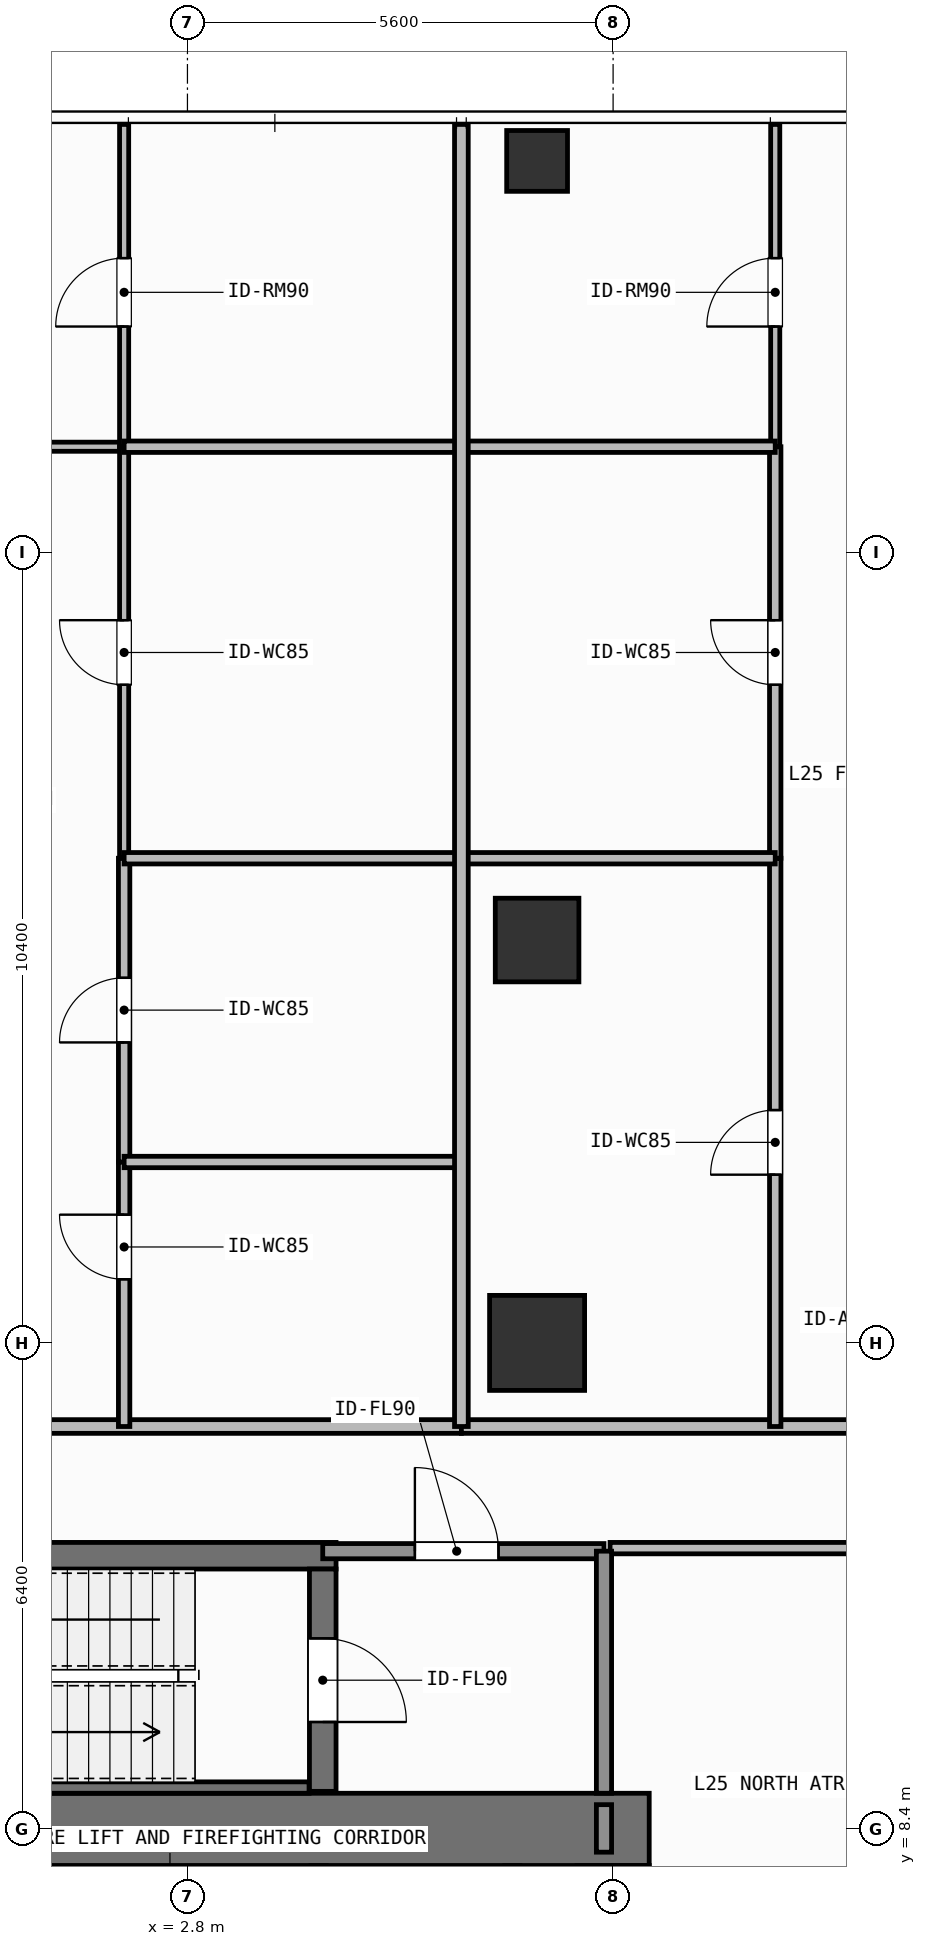
"""IFC4 building model, lengths in metres.
Left out: names, types, materials, properties, quantities, classifications, styles, units other than length and angle.
Written with IfcOpenShell. Run it as: python <this file> out.ifc"""

import sys

from ifc_helpers import new_model, si_unit, direction, frame, frame_2d, origin, origin_2d, place, context, subcontext, project, spatial, rectangle, hollow_rectangle, extrude, element, fill, save


model = new_model("IFC4")
c1 = context("Model", 3, precision=1e-05, world=origin(), true_north=direction((0.0, 1.0)))
c2 = subcontext(c1, "Body", "Model", "MODEL_VIEW")
j1 = project(units=[si_unit("LENGTHUNIT", "METRE"), si_unit("PLANEANGLEUNIT", "RADIAN")], contexts=[c1])
p1 = place(None, origin())
s1 = spatial("IfcSite", under=j1, at=p1, CompositionType="ELEMENT")
p2 = place(p1, origin())
s2 = spatial("IfcBuilding", under=s1, at=p2, CompositionType="ELEMENT")
p3 = place(p2, frame((0.0, 0.0, 100.8)))
s3 = spatial("IfcBuildingStorey", under=s2, at=p3, CompositionType="ELEMENT", Elevation=100.8)
p4 = place(p3, frame((-7.55, 8.4, 0.0), z_axis=(0.0, 0.0, 1.0), x_axis=(1.0, 0.0, 0.0)))
e1 = element("IfcWall", 1, at=p4, inside=s3, PredefinedType="SHEAR", context=c2, shape_type="SweptSolid", body=[
    extrude(rectangle(XDim=16.425, YDim=0.95, at=frame_2d((8.212, 0.0))), origin(), (0.0, 0.0, 1.0), 3.9),
])
p5 = place(p3, frame((8.4, 5.825, 0.0), z_axis=(0.0, 0.0, 1.0), x_axis=(0.0, 1.0, 0.0)))
e2 = element("IfcWall", 2, at=p5, inside=s3, PredefinedType="SHEAR", context=c2, shape_type="SweptSolid", body=[
    extrude(rectangle(XDim=2.1, YDim=0.95, at=frame_2d((1.05, 0.0))), origin(), (0.0, 0.0, 1.0), 3.9),
])
p6 = place(p3, frame((-2.555, 12.0, 0.0), z_axis=(0.0, 0.0, 1.0), x_axis=(1.0, 0.0, 0.0)))
e3 = element("IfcWall", 3, at=p6, inside=s3, PredefinedType="SHEAR", context=c2, shape_type="SweptSolid", body=[
    extrude(rectangle(XDim=7.31, YDim=0.35, at=frame_2d((3.655, 0.0))), origin(), (0.0, 0.0, 1.0), 3.9),
])
p7 = place(p3, frame((-2.2, 8.95, 0.0), z_axis=(0.0, 0.0, 1.0), x_axis=(1.0, 0.0, 0.0)))
e4 = element("IfcWall", 4, at=p7, inside=s3, PredefinedType="SHEAR", context=c2, shape_type="SweptSolid", body=[
    extrude(rectangle(XDim=6.6, YDim=0.15, at=frame_2d((3.3, 0.0))), origin(), (0.0, 0.0, 1.0), 3.9),
])
p8 = place(p3, frame((4.58, 11.825, 0.0), z_axis=(0.0, 0.0, 1.0), x_axis=(0.0, -1.0, 0.0)))
e5 = element("IfcWall", 5, at=p8, inside=s3, PredefinedType="SHEAR", context=c2, shape_type="SweptSolid", body=[
    extrude(rectangle(XDim=2.925, YDim=0.35, at=frame_2d((1.462, 0.0))), origin(), (0.0, 0.0, 1.0), 3.9),
])
p9 = place(p8, frame((0.913, 0.0, 0.0)))
e6 = element("IfcOpeningElement", 6, at=p9, cuts=e5, PredefinedType="OPENING", context=c2, shape_type="SweptSolid", body=[
    extrude(rectangle(XDim=1.1, YDim=2.15, at=frame_2d((0.55, 1.075))), frame((0.0, 0.185, 0.0), z_axis=(0.0, -1.0, 0.0), x_axis=(1.0, 0.0, 0.0)), (0.0, 0.0, 1.0), 0.37),
])
p10 = place(p3, frame((7.4, 14.8, 0.0), z_axis=(0.0, 0.0, 1.0), x_axis=(1.0, 0.0, 0.0)))
e7 = element("IfcColumn", 7, at=p10, inside=s3, PredefinedType="COLUMN", context=c2, shape_type="SweptSolid", body=[
    extrude(rectangle(XDim=1.25, YDim=1.25, at=origin_2d()), origin(), (0.0, 0.0, 1.0), 3.9),
])
p11 = place(p3, frame((7.4, 20.1, 0.0), z_axis=(0.0, 0.0, 1.0), x_axis=(1.0, 0.0, 0.0)))
e8 = element("IfcColumn", 8, at=p11, inside=s3, PredefinedType="COLUMN", context=c2, shape_type="SweptSolid", body=[
    extrude(rectangle(XDim=1.1, YDim=1.1, at=origin_2d()), origin(), (0.0, 0.0, 1.0), 3.9),
])
p12 = place(p3, frame((7.4, 30.35, 0.0), z_axis=(0.0, 0.0, 1.0), x_axis=(1.0, 0.0, 0.0)))
e9 = element("IfcColumn", 9, at=p12, inside=s3, PredefinedType="COLUMN", context=c2, shape_type="SweptSolid", body=[
    extrude(hollow_rectangle(XDim=0.8, YDim=0.8, WallThickness=0.036, at=origin_2d()), origin(), (0.0, 0.0, 1.0), 3.9),
])
p13 = place(p3, frame((4.525, 5.825, 0.0), z_axis=(0.0, 0.0, 1.0), x_axis=(0.0, 1.0, 0.0)))
e10 = element("IfcWall", 10, at=p13, inside=s3, PredefinedType="SHEAR", context=c2, shape_type="SweptSolid", body=[
    extrude(rectangle(XDim=2.1, YDim=0.2, at=frame_2d((1.05, 0.0))), origin(), (0.0, 0.0, 1.0), 3.68),
])
p14 = place(p13, frame((0.425, 0.0, 0.0)))
e11 = element("IfcOpeningElement", 11, at=p14, cuts=e10, PredefinedType="OPENING", context=c2, shape_type="SweptSolid", body=[
    extrude(rectangle(XDim=1.1, YDim=2.2, at=frame_2d((0.55, 1.1))), frame((0.0, 0.11, 0.0), z_axis=(0.0, -1.0, 0.0), x_axis=(1.0, 0.0, 0.0)), (0.0, 0.0, 1.0), 0.22),
])
p15 = place(p3, frame((7.075, 5.825, 0.0), z_axis=(0.0, 0.0, 1.0), x_axis=(0.0, 1.0, 0.0)))
e12 = element("IfcWall", 12, at=p15, inside=s3, PredefinedType="SHEAR", context=c2, shape_type="SweptSolid", body=[
    extrude(rectangle(XDim=2.1, YDim=0.2, at=frame_2d((1.05, 0.0))), origin(), (0.0, 0.0, 1.0), 3.68),
])
p16 = place(p3, frame((4.58, 12.06, 0.0), z_axis=(0.0, 0.0, 1.0), x_axis=(1.0, 0.0, 0.0)))
e13 = element("IfcWall", 13, at=p16, inside=s3, PredefinedType="SOLIDWALL", context=c2, shape_type="SweptSolid", body=[
    extrude(rectangle(XDim=3.7, YDim=0.2, at=frame_2d((1.85, 0.0))), origin(), (0.0, 0.0, 1.0), 3.68),
])
p17 = place(p16, frame((1.212, 0.0, 0.0)))
e14 = element("IfcOpeningElement", 14, at=p17, cuts=e13, PredefinedType="OPENING", context=c2, shape_type="SweptSolid", body=[
    extrude(rectangle(XDim=1.1, YDim=2.15, at=frame_2d((0.55, 1.075))), frame((0.0, 0.11, 0.0), z_axis=(0.0, -1.0, 0.0), x_axis=(1.0, 0.0, 0.0)), (0.0, 0.0, 1.0), 0.22),
])
p18 = place(p3, frame((8.36, 12.1, 0.0), z_axis=(0.0, 0.0, 1.0), x_axis=(1.0, 0.0, 0.0)))
e15 = element("IfcWall", 15, at=p18, inside=s3, PredefinedType="PARTITIONING", context=c2, shape_type="SweptSolid", body=[
    extrude(rectangle(XDim=7.22, YDim=0.15, at=frame_2d((3.61, 0.0))), origin(), (0.0, 0.0, 1.0), 3.68),
])
p19 = place(p18, frame((3.513, 0.0, 0.0)))
e16 = element("IfcOpeningElement", 16, at=p19, cuts=e15, PredefinedType="OPENING", context=c2, shape_type="SweptSolid", body=[
    extrude(rectangle(XDim=0.9, YDim=2.1, at=frame_2d((0.45, 1.05))), frame((0.0, 0.085, 0.0), z_axis=(0.0, -1.0, 0.0), x_axis=(1.0, 0.0, 0.0)), (0.0, 0.0, 1.0), 0.17),
])
p20 = place(p3, frame((-14.808, 13.7, 0.0), z_axis=(0.0, 0.0, 1.0), x_axis=(1.0, 0.0, 0.0)))
e17 = element("IfcWall", 17, at=p20, inside=s3, PredefinedType="PARTITIONING", context=c2, shape_type="SweptSolid", body=[
    extrude(rectangle(XDim=21.212, YDim=0.18, at=frame_2d((10.606, 0.0))), origin(), (0.0, 0.0, 1.0), 3.68),
])
p21 = place(p20, frame((11.271, 0.0, 0.0)))
e18 = element("IfcOpeningElement", 18, at=p21, cuts=e17, PredefinedType="OPENING", context=c2, shape_type="SweptSolid", body=[
    extrude(rectangle(XDim=1.0, YDim=2.2, at=frame_2d((0.5, 1.1))), frame((0.0, 0.1, 0.0), z_axis=(0.0, -1.0, 0.0), x_axis=(1.0, 0.0, 0.0)), (0.0, 0.0, 1.0), 0.2),
])
p22 = place(p3, frame((-3.723, 26.59, 0.0), z_axis=(0.0, 0.0, 1.0), x_axis=(1.0, 0.0, 0.0)))
e19 = element("IfcWall", 19, at=p22, inside=s3, PredefinedType="PARTITIONING", context=c2, shape_type="SweptSolid", body=[
    extrude(rectangle(XDim=5.69, YDim=0.12, at=frame_2d((2.845, 0.0))), origin(), (0.0, 0.0, 1.0), 3.68),
])
p23 = place(p22, frame((2.306, 0.0, 0.0)))
e20 = element("IfcOpeningElement", 20, at=p23, cuts=e19, PredefinedType="OPENING", context=c2, shape_type="SweptSolid", body=[
    extrude(rectangle(XDim=0.9, YDim=2.1, at=frame_2d((0.45, 1.05))), frame((0.0, 0.07, 0.0), z_axis=(0.0, -1.0, 0.0), x_axis=(1.0, 0.0, 0.0)), (0.0, 0.0, 1.0), 0.14),
])
p24 = place(p3, frame((1.967, 13.7, 0.0), z_axis=(0.0, 0.0, 1.0), x_axis=(0.0, 1.0, 0.0)))
e21 = element("IfcWall", 21, at=p24, inside=s3, PredefinedType="PARTITIONING", context=c2, shape_type="SweptSolid", body=[
    extrude(rectangle(XDim=3.48, YDim=0.15, at=frame_2d((1.74, 0.0))), origin(), (0.0, 0.0, 1.0), 3.68),
])
p25 = place(p24, frame((1.937, 0.0, 0.0)))
e22 = element("IfcOpeningElement", 22, at=p25, cuts=e21, PredefinedType="OPENING", context=c2, shape_type="SweptSolid", body=[
    extrude(rectangle(XDim=0.85, YDim=2.1, at=frame_2d((0.425, 1.05))), frame((0.0, 0.085, 0.0), z_axis=(0.0, -1.0, 0.0), x_axis=(1.0, 0.0, 0.0)), (0.0, 0.0, 1.0), 0.17),
])
p26 = place(p3, frame((1.967, 17.18, 0.0), z_axis=(0.0, 0.0, 1.0), x_axis=(0.0, 1.0, 0.0)))
e23 = element("IfcWall", 23, at=p26, inside=s3, PredefinedType="PARTITIONING", context=c2, shape_type="SweptSolid", body=[
    extrude(rectangle(XDim=3.996, YDim=0.15, at=frame_2d((1.998, 0.0))), origin(), (0.0, 0.0, 1.0), 3.68),
])
p27 = place(p26, frame((1.573, 0.0, 0.0)))
e24 = element("IfcOpeningElement", 24, at=p27, cuts=e23, PredefinedType="OPENING", context=c2, shape_type="SweptSolid", body=[
    extrude(rectangle(XDim=0.85, YDim=2.1, at=frame_2d((0.425, 1.05))), frame((0.0, 0.085, 0.0), z_axis=(0.0, -1.0, 0.0), x_axis=(1.0, 0.0, 0.0)), (0.0, 0.0, 1.0), 0.17),
])
p28 = place(p3, frame((1.967, 21.176, 0.0), z_axis=(0.0, 0.0, 1.0), x_axis=(0.0, 1.0, 0.0)))
e25 = element("IfcWall", 25, at=p28, inside=s3, PredefinedType="PARTITIONING", context=c2, shape_type="SweptSolid", body=[
    extrude(rectangle(XDim=5.414, YDim=0.12, at=frame_2d((2.707, 0.0))), origin(), (0.0, 0.0, 1.0), 3.68),
])
p29 = place(p28, frame((2.282, 0.0, 0.0)))
e26 = element("IfcOpeningElement", 26, at=p29, cuts=e25, PredefinedType="OPENING", context=c2, shape_type="SweptSolid", body=[
    extrude(rectangle(XDim=0.85, YDim=2.1, at=frame_2d((0.425, 1.05))), frame((0.0, 0.07, 0.0), z_axis=(0.0, -1.0, 0.0), x_axis=(1.0, 0.0, 0.0)), (0.0, 0.0, 1.0), 0.14),
])
p30 = place(p3, frame((1.967, 26.59, 0.0), z_axis=(0.0, 0.0, 1.0), x_axis=(0.0, 1.0, 0.0)))
e27 = element("IfcWall", 27, at=p30, inside=s3, PredefinedType="PARTITIONING", context=c2, shape_type="SweptSolid", body=[
    extrude(rectangle(XDim=4.24, YDim=0.12, at=frame_2d((2.12, 0.0))), origin(), (0.0, 0.0, 1.0), 3.68),
])
p31 = place(p30, frame((1.581, 0.0, 0.0)))
e28 = element("IfcOpeningElement", 28, at=p31, cuts=e27, PredefinedType="OPENING", context=c2, shape_type="SweptSolid", body=[
    extrude(rectangle(XDim=0.9, YDim=2.1, at=frame_2d((0.45, 1.05))), frame((0.0, 0.07, 0.0), z_axis=(0.0, -1.0, 0.0), x_axis=(1.0, 0.0, 0.0)), (0.0, 0.0, 1.0), 0.14),
])
p32 = place(p3, frame((6.404, 13.7, 0.0), z_axis=(0.0, 0.0, 1.0), x_axis=(1.0, 0.0, 0.0)))
e29 = element("IfcWall", 29, at=p32, inside=s3, PredefinedType="PARTITIONING", context=c2, shape_type="SweptSolid", body=[
    extrude(rectangle(XDim=12.216, YDim=0.18, at=frame_2d((6.108, 0.0))), origin(), (0.0, 0.0, 1.0), 3.68),
])
p33 = place(p32, frame((5.34, 0.0, 0.0)))
e30 = element("IfcOpeningElement", 30, at=p33, cuts=e29, PredefinedType="OPENING", context=c2, shape_type="SweptSolid", body=[
    extrude(rectangle(XDim=1.0, YDim=2.2, at=frame_2d((0.5, 1.1))), frame((0.0, 0.1, 0.0), z_axis=(0.0, -1.0, 0.0), x_axis=(1.0, 0.0, 0.0)), (0.0, 0.0, 1.0), 0.2),
])
p34 = place(p3, frame((10.533, 13.7, 0.0), z_axis=(0.0, 0.0, 1.0), x_axis=(0.0, 1.0, 0.0)))
e31 = element("IfcWall", 31, at=p34, inside=s3, PredefinedType="PARTITIONING", context=c2, shape_type="SweptSolid", body=[
    extrude(rectangle(XDim=7.476, YDim=0.15, at=frame_2d((3.738, 0.0))), origin(), (0.0, 0.0, 1.0), 3.68),
])
p35 = place(p34, frame((3.313, 0.0, 0.0)))
e32 = element("IfcOpeningElement", 32, at=p35, cuts=e31, PredefinedType="OPENING", context=c2, shape_type="SweptSolid", body=[
    extrude(rectangle(XDim=0.85, YDim=2.1, at=frame_2d((0.425, 1.05))), frame((0.0, 0.085, 0.0), z_axis=(0.0, -1.0, 0.0), x_axis=(1.0, 0.0, 0.0)), (0.0, 0.0, 1.0), 0.17),
])
p36 = place(p3, frame((10.533, 21.176, 0.0), z_axis=(0.0, 0.0, 1.0), x_axis=(0.0, 1.0, 0.0)))
e33 = element("IfcWall", 33, at=p36, inside=s3, PredefinedType="PARTITIONING", context=c2, shape_type="SweptSolid", body=[
    extrude(rectangle(XDim=5.414, YDim=0.15, at=frame_2d((2.707, 0.0))), origin(), (0.0, 0.0, 1.0), 3.68),
])
p37 = place(p36, frame((2.282, 0.0, 0.0)))
e34 = element("IfcOpeningElement", 34, at=p37, cuts=e33, PredefinedType="OPENING", context=c2, shape_type="SweptSolid", body=[
    extrude(rectangle(XDim=0.85, YDim=2.1, at=frame_2d((0.425, 1.05))), frame((0.0, 0.085, 0.0), z_axis=(0.0, -1.0, 0.0), x_axis=(1.0, 0.0, 0.0)), (0.0, 0.0, 1.0), 0.17),
])
p38 = place(p3, frame((10.533, 26.59, 0.0), z_axis=(0.0, 0.0, 1.0), x_axis=(0.0, 1.0, 0.0)))
e35 = element("IfcWall", 35, at=p38, inside=s3, PredefinedType="PARTITIONING", context=c2, shape_type="SweptSolid", body=[
    extrude(rectangle(XDim=4.24, YDim=0.12, at=frame_2d((2.12, 0.0))), origin(), (0.0, 0.0, 1.0), 3.68),
])
p39 = place(p38, frame((1.581, 0.0, 0.0)))
e36 = element("IfcOpeningElement", 36, at=p39, cuts=e35, PredefinedType="OPENING", context=c2, shape_type="SweptSolid", body=[
    extrude(rectangle(XDim=0.9, YDim=2.1, at=frame_2d((0.45, 1.05))), frame((0.0, 0.07, 0.0), z_axis=(0.0, -1.0, 0.0), x_axis=(1.0, 0.0, 0.0)), (0.0, 0.0, 1.0), 0.14),
])
p40 = place(p3, frame((8.28, 8.875, 0.0), z_axis=(0.0, 0.0, 1.0), x_axis=(0.0, 1.0, 0.0)))
e37 = element("IfcWall", 37, at=p40, inside=s3, PredefinedType="SOLIDWALL", context=c2, shape_type="SweptSolid", body=[
    extrude(rectangle(XDim=3.185, YDim=0.2, at=frame_2d((1.593, 0.0))), origin(), (0.0, 0.0, 1.0), 3.68),
])
p41 = place(p3, frame((8.28, 8.1, 0.0), z_axis=(0.0, 0.0, 1.0), x_axis=(0.0, 1.0, 0.0)))
e38 = element("IfcWall", 38, at=p41, inside=s3, PredefinedType="SOLIDWALL", context=c2, shape_type="SweptSolid", body=[
    extrude(rectangle(XDim=0.625, YDim=0.2, at=frame_2d((0.312, 0.0))), origin(), (0.0, 0.0, 1.0), 3.68),
])
for number, where, z_axis, x_axis in (
    (39, (1.967, 17.18, 0.0), (0.0, 0.0, 1.0), (1.0, 0.0, 0.0)),
    (40, (1.967, 21.176, 0.0), (0.0, 0.0, 1.0), (1.0, 0.0, 0.0)),
    (41, (1.967, 26.59, 0.0), (0.0, 0.0, 1.0), (1.0, 0.0, 0.0)),
):
    element("IfcWall", number, at=place(p3, frame(where, z_axis=z_axis, x_axis=x_axis)), inside=s3, PredefinedType="PARTITIONING", context=c2, shape_type="SweptSolid", body=[
        extrude(rectangle(XDim=4.437, YDim=0.15, at=frame_2d((2.219, 0.0))), origin(), (0.0, 0.0, 1.0), 3.68),
    ])
for number, where, z_axis, x_axis in (
    (42, (6.404, 21.176, 0.0), (0.0, 0.0, 1.0), (1.0, 0.0, 0.0)),
    (43, (6.404, 26.59, 0.0), (0.0, 0.0, 1.0), (1.0, 0.0, 0.0)),
):
    element("IfcWall", number, at=place(p3, frame(where, z_axis=z_axis, x_axis=x_axis)), inside=s3, PredefinedType="PARTITIONING", context=c2, shape_type="SweptSolid", body=[
        extrude(rectangle(XDim=4.129, YDim=0.15, at=frame_2d((2.064, 0.0))), origin(), (0.0, 0.0, 1.0), 3.68),
    ])
p42 = place(p3, frame((6.404, 13.7, 0.0), z_axis=(0.0, 0.0, 1.0), x_axis=(0.0, 1.0, 0.0)))
e44 = element("IfcWall", 44, at=p42, inside=s3, PredefinedType="PARTITIONING", context=c2, shape_type="SweptSolid", body=[
    extrude(rectangle(XDim=17.13, YDim=0.18, at=frame_2d((8.565, 0.0))), origin(), (0.0, 0.0, 1.0), 3.68),
])
p43 = place(p9, origin())
e45 = element("IfcDoor", 45, at=p43, inside=s3, OperationType="SINGLE_SWING_RIGHT", PredefinedType="DOOR", context=c2, shape_type="SweptSolid", body=[
    extrude(rectangle(XDim=1.1, YDim=2.15, at=frame_2d((0.55, 1.075))), frame((0.0, 0.025, 0.0), z_axis=(0.0, -1.0, 0.0), x_axis=(1.0, 0.0, 0.0)), (0.0, 0.0, 1.0), 0.05),
])
fill(e6, e45)
p44 = place(p17, origin())
e46 = element("IfcDoor", 46, at=p44, inside=s3, OperationType="SINGLE_SWING_LEFT", PredefinedType="DOOR", context=c2, shape_type="SweptSolid", body=[
    extrude(rectangle(XDim=1.1, YDim=2.15, at=frame_2d((0.55, 1.075))), frame((0.0, 0.025, 0.0), z_axis=(0.0, -1.0, 0.0), x_axis=(1.0, 0.0, 0.0)), (0.0, 0.0, 1.0), 0.05),
])
fill(e14, e46)
p45 = place(p25, origin())
e47 = element("IfcDoor", 47, at=p45, inside=s3, OperationType="SINGLE_SWING_RIGHT", PredefinedType="DOOR", context=c2, shape_type="SweptSolid", body=[
    extrude(rectangle(XDim=0.85, YDim=2.1, at=frame_2d((0.425, 1.05))), frame((0.0, 0.025, 0.0), z_axis=(0.0, -1.0, 0.0), x_axis=(1.0, 0.0, 0.0)), (0.0, 0.0, 1.0), 0.05),
])
fill(e22, e47)
p46 = place(p27, origin())
e48 = element("IfcDoor", 48, at=p46, inside=s3, OperationType="SINGLE_SWING_LEFT", PredefinedType="DOOR", context=c2, shape_type="SweptSolid", body=[
    extrude(rectangle(XDim=0.85, YDim=2.1, at=frame_2d((0.425, 1.05))), frame((0.0, 0.025, 0.0), z_axis=(0.0, -1.0, 0.0), x_axis=(1.0, 0.0, 0.0)), (0.0, 0.0, 1.0), 0.05),
])
fill(e24, e48)
p47 = place(p29, origin())
e49 = element("IfcDoor", 49, at=p47, inside=s3, OperationType="SINGLE_SWING_RIGHT", PredefinedType="DOOR", context=c2, shape_type="SweptSolid", body=[
    extrude(rectangle(XDim=0.85, YDim=2.1, at=frame_2d((0.425, 1.05))), frame((0.0, 0.025, 0.0), z_axis=(0.0, -1.0, 0.0), x_axis=(1.0, 0.0, 0.0)), (0.0, 0.0, 1.0), 0.05),
])
fill(e26, e49)
p48 = place(p31, origin())
e50 = element("IfcDoor", 50, at=p48, inside=s3, OperationType="SINGLE_SWING_LEFT", PredefinedType="DOOR", context=c2, shape_type="SweptSolid", body=[
    extrude(rectangle(XDim=0.9, YDim=2.1, at=frame_2d((0.45, 1.05))), frame((0.0, 0.025, 0.0), z_axis=(0.0, -1.0, 0.0), x_axis=(1.0, 0.0, 0.0)), (0.0, 0.0, 1.0), 0.05),
])
fill(e28, e50)
p49 = place(p35, origin())
e51 = element("IfcDoor", 51, at=p49, inside=s3, OperationType="SINGLE_SWING_LEFT", PredefinedType="DOOR", context=c2, shape_type="SweptSolid", body=[
    extrude(rectangle(XDim=0.85, YDim=2.1, at=frame_2d((0.425, 1.05))), frame((0.0, 0.025, 0.0), z_axis=(0.0, -1.0, 0.0), x_axis=(1.0, 0.0, 0.0)), (0.0, 0.0, 1.0), 0.05),
])
fill(e32, e51)
p50 = place(p37, origin())
e52 = element("IfcDoor", 52, at=p50, inside=s3, OperationType="SINGLE_SWING_RIGHT", PredefinedType="DOOR", context=c2, shape_type="SweptSolid", body=[
    extrude(rectangle(XDim=0.85, YDim=2.1, at=frame_2d((0.425, 1.05))), frame((0.0, 0.025, 0.0), z_axis=(0.0, -1.0, 0.0), x_axis=(1.0, 0.0, 0.0)), (0.0, 0.0, 1.0), 0.05),
])
fill(e34, e52)
p51 = place(p39, origin())
e53 = element("IfcDoor", 53, at=p51, inside=s3, OperationType="SINGLE_SWING_LEFT", PredefinedType="DOOR", context=c2, shape_type="SweptSolid", body=[
    extrude(rectangle(XDim=0.9, YDim=2.1, at=frame_2d((0.45, 1.05))), frame((0.0, 0.025, 0.0), z_axis=(0.0, -1.0, 0.0), x_axis=(1.0, 0.0, 0.0)), (0.0, 0.0, 1.0), 0.05),
])
fill(e36, e53)
save(model, sys.argv[1])
